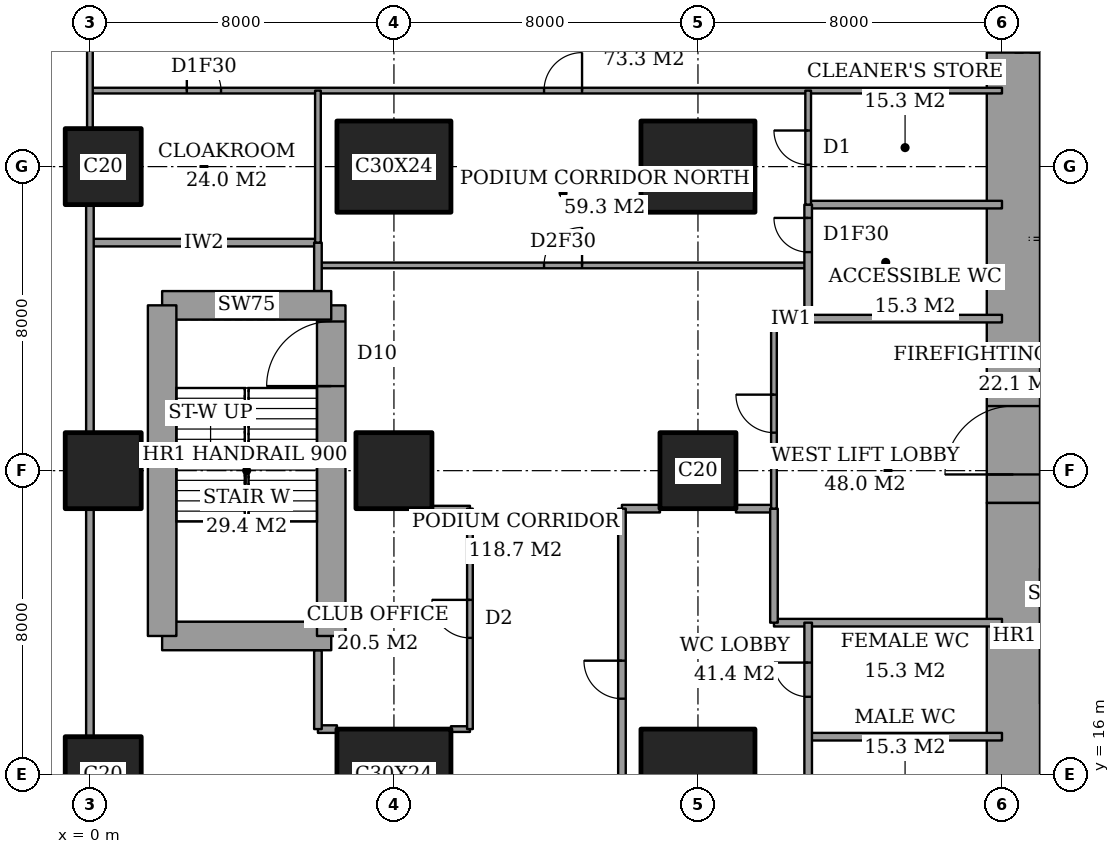
"""IFC4 building model, lengths in metres.
Left out: names, types, materials, properties, quantities, classifications, styles, units other than length and angle.
Written with IfcOpenShell. Run it as: python <this file> out.ifc"""

import sys

from ifc_helpers import new_model, si_unit, direction, frame, frame_2d, origin, origin_2d, place, context, subcontext, project, spatial, rectangle, extrude, element, fill, save


model = new_model("IFC4")
c1 = context("Model", 3, precision=1e-05, world=origin(), true_north=direction((0.0, 1.0)))
c2 = subcontext(c1, "Body", "Model", "MODEL_VIEW")
j1 = project(units=[si_unit("LENGTHUNIT", "METRE"), si_unit("PLANEANGLEUNIT", "RADIAN")], contexts=[c1])
p1 = place(None, origin())
s1 = spatial("IfcSite", under=j1, at=p1, CompositionType="ELEMENT")
p2 = place(p1, origin())
s2 = spatial("IfcBuilding", under=s1, at=p2, CompositionType="ELEMENT")
p3 = place(p2, frame((0.0, 0.0, 6.0)))
s3 = spatial("IfcBuildingStorey", under=s2, at=p3, CompositionType="ELEMENT", Elevation=6.0)
for number, where, z_axis, x_axis in (
    (1, (0.35, 16.0, 0.0), (0.0, 0.0, 1.0), (1.0, 0.0, 0.0)),
    (2, (0.35, 24.0, 0.0), (0.0, 0.0, 1.0), (1.0, 0.0, 0.0)),
    (3, (0.35, 32.0, 0.0), (0.0, 0.0, 1.0), (1.0, 0.0, 0.0)),
):
    element("IfcColumn", number, at=place(p3, frame(where, z_axis=z_axis, x_axis=x_axis)), inside=s3, PredefinedType="COLUMN", context=c2, shape_type="SweptSolid", body=[
        extrude(rectangle(XDim=2.0, YDim=2.0, at=origin_2d()), origin(), (0.0, 0.0, 1.0), 5.0),
    ])
p4 = place(p3, frame((8.0, 16.0, 0.0), z_axis=(0.0, 0.0, 1.0), x_axis=(1.0, 0.0, 0.0)))
e4 = element("IfcColumn", 4, at=p4, inside=s3, PredefinedType="COLUMN", context=c2, shape_type="SweptSolid", body=[
    extrude(rectangle(XDim=3.0, YDim=2.4, at=origin_2d()), origin(), (0.0, 0.0, 1.0), 5.0),
])
p5 = place(p3, frame((8.0, 24.0, 0.0), z_axis=(0.0, 0.0, 1.0), x_axis=(1.0, 0.0, 0.0)))
e5 = element("IfcColumn", 5, at=p5, inside=s3, PredefinedType="COLUMN", context=c2, shape_type="SweptSolid", body=[
    extrude(rectangle(XDim=2.0, YDim=2.0, at=origin_2d()), origin(), (0.0, 0.0, 1.0), 5.0),
])
for number, where, z_axis, x_axis in (
    (6, (8.0, 32.0, 0.0), (0.0, 0.0, 1.0), (1.0, 0.0, 0.0)),
    (7, (16.0, 16.0, 0.0), (0.0, 0.0, 1.0), (1.0, 0.0, 0.0)),
):
    element("IfcColumn", number, at=place(p3, frame(where, z_axis=z_axis, x_axis=x_axis)), inside=s3, PredefinedType="COLUMN", context=c2, shape_type="SweptSolid", body=[
        extrude(rectangle(XDim=3.0, YDim=2.4, at=origin_2d()), origin(), (0.0, 0.0, 1.0), 5.0),
    ])
p6 = place(p3, frame((16.0, 24.0, 0.0), z_axis=(0.0, 0.0, 1.0), x_axis=(1.0, 0.0, 0.0)))
e8 = element("IfcColumn", 8, at=p6, inside=s3, PredefinedType="COLUMN", context=c2, shape_type="SweptSolid", body=[
    extrude(rectangle(XDim=2.0, YDim=2.0, at=origin_2d()), origin(), (0.0, 0.0, 1.0), 5.0),
])
p7 = place(p3, frame((16.0, 32.0, 0.0), z_axis=(0.0, 0.0, 1.0), x_axis=(1.0, 0.0, 0.0)))
e9 = element("IfcColumn", 9, at=p7, inside=s3, PredefinedType="COLUMN", context=c2, shape_type="SweptSolid", body=[
    extrude(rectangle(XDim=3.0, YDim=2.4, at=origin_2d()), origin(), (0.0, 0.0, 1.0), 5.0),
])
p8 = place(p3, frame((24.3, 13.0, 0.0), z_axis=(0.0, 0.0, 1.0), x_axis=(0.0, 1.0, 0.0)))
e10 = element("IfcWall", 10, at=p8, inside=s3, PredefinedType="SHEAR", context=c2, shape_type="SweptSolid", body=[
    extrude(rectangle(XDim=10.15, YDim=1.4, at=frame_2d((5.075, 0.0))), origin(), (0.0, 0.0, 1.0), 5.0),
])
p9 = place(p3, frame((24.3, 23.15, 0.0), z_axis=(0.0, 0.0, 1.0), x_axis=(0.0, 1.0, 0.0)))
e11 = element("IfcWall", 11, at=p9, inside=s3, PredefinedType="SHEAR", context=c2, shape_type="SweptSolid", body=[
    extrude(rectangle(XDim=11.85, YDim=1.4, at=frame_2d((5.925, 0.0))), origin(), (0.0, 0.0, 1.0), 5.0),
])
p10 = place(p9, frame((0.75, 0.0, 0.0)))
e12 = element("IfcOpeningElement", 12, at=p10, cuts=e11, PredefinedType="OPENING", context=c2, shape_type="SweptSolid", body=[
    extrude(rectangle(XDim=1.8, YDim=2.4, at=frame_2d((0.9, 1.2))), frame((0.0, 0.71, 0.0), z_axis=(0.0, -1.0, 0.0), x_axis=(1.0, 0.0, 0.0)), (0.0, 0.0, 1.0), 1.42),
])
p11 = place(p3, frame((1.9, 19.65, 0.0), z_axis=(0.0, 0.0, 1.0), x_axis=(1.0, 0.0, 0.0)))
e13 = element("IfcWall", 13, at=p11, inside=s3, PredefinedType="SHEAR", context=c2, shape_type="SweptSolid", body=[
    extrude(rectangle(XDim=4.45, YDim=0.75, at=frame_2d((2.225, 0.0))), origin(), (0.0, 0.0, 1.0), 5.0),
])
p12 = place(p3, frame((6.35, 19.65, 0.0), z_axis=(0.0, 0.0, 1.0), x_axis=(0.0, 1.0, 0.0)))
e14 = element("IfcWall", 14, at=p12, inside=s3, PredefinedType="SHEAR", context=c2, shape_type="SweptSolid", body=[
    extrude(rectangle(XDim=8.7, YDim=0.75, at=frame_2d((4.35, 0.0))), origin(), (0.0, 0.0, 1.0), 5.0),
])
p13 = place(p12, frame((6.575, 0.0, 0.0)))
e15 = element("IfcOpeningElement", 15, at=p13, cuts=e14, PredefinedType="OPENING", context=c2, shape_type="SweptSolid", body=[
    extrude(rectangle(XDim=1.7, YDim=2.1, at=frame_2d((0.85, 1.05))), frame((0.0, 0.385, 0.0), z_axis=(0.0, -1.0, 0.0), x_axis=(1.0, 0.0, 0.0)), (0.0, 0.0, 1.0), 0.77),
])
p14 = place(p3, frame((6.35, 28.35, 0.0), z_axis=(0.0, 0.0, 1.0), x_axis=(-1.0, 0.0, 0.0)))
e16 = element("IfcWall", 16, at=p14, inside=s3, PredefinedType="SHEAR", context=c2, shape_type="SweptSolid", body=[
    extrude(rectangle(XDim=4.45, YDim=0.75, at=frame_2d((2.225, 0.0))), origin(), (0.0, 0.0, 1.0), 5.0),
])
p15 = place(p3, frame((1.9, 28.35, 0.0), z_axis=(0.0, 0.0, 1.0), x_axis=(0.0, -1.0, 0.0)))
e17 = element("IfcWall", 17, at=p15, inside=s3, PredefinedType="SHEAR", context=c2, shape_type="SweptSolid", body=[
    extrude(rectangle(XDim=8.7, YDim=0.75, at=frame_2d((4.35, 0.0))), origin(), (0.0, 0.0, 1.0), 5.0),
])
p16 = place(p3, frame((18.9, 17.0, 0.0), z_axis=(0.0, 0.0, 1.0), x_axis=(1.0, 0.0, 0.0)))
e18 = element("IfcWall", 18, at=p16, inside=s3, PredefinedType="PARTITIONING", context=c2, shape_type="SweptSolid", body=[
    extrude(rectangle(XDim=5.1, YDim=0.2, at=frame_2d((2.55, 0.0))), origin(), (0.0, 0.0, 1.0), 4.7),
])
p17 = place(p3, frame((6.0, 17.2, 0.0), z_axis=(0.0, 0.0, 1.0), x_axis=(1.0, 0.0, 0.0)))
e19 = element("IfcWall", 19, at=p17, inside=s3, PredefinedType="PARTITIONING", context=c2, shape_type="SweptSolid", body=[
    extrude(rectangle(XDim=0.5, YDim=0.2, at=frame_2d((0.25, 0.0))), origin(), (0.0, 0.0, 1.0), 4.7),
])
p18 = place(p3, frame((9.5, 17.2, 0.0), z_axis=(0.0, 0.0, 1.0), x_axis=(1.0, 0.0, 0.0)))
e20 = element("IfcWall", 20, at=p18, inside=s3, PredefinedType="PARTITIONING", context=c2, shape_type="SweptSolid", body=[
    extrude(rectangle(XDim=0.5, YDim=0.15, at=frame_2d((0.25, 0.0))), origin(), (0.0, 0.0, 1.0), 4.7),
])
p19 = place(p3, frame((18.0, 20.0, 0.0), z_axis=(0.0, 0.0, 1.0), x_axis=(1.0, 0.0, 0.0)))
e21 = element("IfcWall", 21, at=p19, inside=s3, PredefinedType="PARTITIONING", context=c2, shape_type="SweptSolid", body=[
    extrude(rectangle(XDim=6.0, YDim=0.2, at=frame_2d((3.0, 0.0))), origin(), (0.0, 0.0, 1.0), 4.7),
])
for number, where, z_axis, x_axis in (
    (22, (14.0, 23.0, 0.0), (0.0, 0.0, 1.0), (1.0, 0.0, 0.0)),
    (23, (17.0, 23.0, 0.0), (0.0, 0.0, 1.0), (1.0, 0.0, 0.0)),
):
    element("IfcWall", number, at=place(p3, frame(where, z_axis=z_axis, x_axis=x_axis)), inside=s3, PredefinedType="PARTITIONING", context=c2, shape_type="SweptSolid", body=[
        extrude(rectangle(XDim=1.0, YDim=0.2, at=frame_2d((0.5, 0.0))), origin(), (0.0, 0.0, 1.0), 4.7),
    ])
p20 = place(p3, frame((9.0, 23.0, 0.0), z_axis=(0.0, 0.0, 1.0), x_axis=(1.0, 0.0, 0.0)))
e24 = element("IfcWall", 24, at=p20, inside=s3, PredefinedType="PARTITIONING", context=c2, shape_type="SweptSolid", body=[
    extrude(rectangle(XDim=1.0, YDim=0.15, at=frame_2d((0.5, 0.0))), origin(), (0.0, 0.0, 1.0), 4.7),
])
p21 = place(p3, frame((18.9, 28.0, 0.0), z_axis=(0.0, 0.0, 1.0), x_axis=(1.0, 0.0, 0.0)))
e25 = element("IfcWall", 25, at=p21, inside=s3, PredefinedType="PARTITIONING", context=c2, shape_type="SweptSolid", body=[
    extrude(rectangle(XDim=5.1, YDim=0.2, at=frame_2d((2.55, 0.0))), origin(), (0.0, 0.0, 1.0), 4.7),
])
p22 = place(p3, frame((18.0, 28.0, 0.0), z_axis=(0.0, 0.0, 1.0), x_axis=(1.0, 0.0, 0.0)))
e26 = element("IfcWall", 26, at=p22, inside=s3, PredefinedType="PARTITIONING", context=c2, shape_type="SweptSolid", body=[
    extrude(rectangle(XDim=0.9, YDim=0.15, at=frame_2d((0.45, 0.0))), origin(), (0.0, 0.0, 1.0), 4.7),
])
p23 = place(p3, frame((6.0, 29.4, 0.0), z_axis=(0.0, 0.0, 1.0), x_axis=(1.0, 0.0, 0.0)))
e27 = element("IfcWall", 27, at=p23, inside=s3, PredefinedType="PARTITIONING", context=c2, shape_type="SweptSolid", body=[
    extrude(rectangle(XDim=12.9, YDim=0.15, at=frame_2d((6.45, 0.0))), origin(), (0.0, 0.0, 1.0), 4.7),
])
p24 = place(p23, frame((5.95, 0.0, 0.0)))
e28 = element("IfcOpeningElement", 28, at=p24, cuts=e27, PredefinedType="OPENING", context=c2, shape_type="SweptSolid", body=[
    extrude(rectangle(XDim=1.0, YDim=2.1, at=frame_2d((0.5, 1.05))), frame((0.0, 0.085, 0.0), z_axis=(0.0, -1.0, 0.0), x_axis=(1.0, 0.0, 0.0)), (0.0, 0.0, 1.0), 0.17),
])
p25 = place(p3, frame((0.0, 30.0, 0.0), z_axis=(0.0, 0.0, 1.0), x_axis=(1.0, 0.0, 0.0)))
e29 = element("IfcWall", 29, at=p25, inside=s3, PredefinedType="PARTITIONING", context=c2, shape_type="SweptSolid", body=[
    extrude(rectangle(XDim=6.0, YDim=0.2, at=frame_2d((3.0, 0.0))), origin(), (0.0, 0.0, 1.0), 4.7),
])
p26 = place(p3, frame((18.9, 31.0, 0.0), z_axis=(0.0, 0.0, 1.0), x_axis=(1.0, 0.0, 0.0)))
e30 = element("IfcWall", 30, at=p26, inside=s3, PredefinedType="PARTITIONING", context=c2, shape_type="SweptSolid", body=[
    extrude(rectangle(XDim=5.1, YDim=0.2, at=frame_2d((2.55, 0.0))), origin(), (0.0, 0.0, 1.0), 4.7),
])
p27 = place(p3, frame((0.0, 34.0, 0.0), z_axis=(0.0, 0.0, 1.0), x_axis=(1.0, 0.0, 0.0)))
e31 = element("IfcWall", 31, at=p27, inside=s3, PredefinedType="PARTITIONING", context=c2, shape_type="SweptSolid", body=[
    extrude(rectangle(XDim=24.0, YDim=0.15, at=frame_2d((12.0, 0.0))), origin(), (0.0, 0.0, 1.0), 4.7),
])
p28 = place(p27, frame((11.95, 0.0, 0.0)))
e32 = element("IfcOpeningElement", 32, at=p28, cuts=e31, PredefinedType="OPENING", context=c2, shape_type="SweptSolid", body=[
    extrude(rectangle(XDim=1.0, YDim=2.1, at=frame_2d((0.5, 1.05))), frame((0.0, 0.085, 0.0), z_axis=(0.0, -1.0, 0.0), x_axis=(1.0, 0.0, 0.0)), (0.0, 0.0, 1.0), 0.17),
])
p29 = place(p27, frame((2.55, 0.0, 0.0)))
e33 = element("IfcOpeningElement", 33, at=p29, cuts=e31, PredefinedType="OPENING", context=c2, shape_type="SweptSolid", body=[
    extrude(rectangle(XDim=0.9, YDim=2.1, at=frame_2d((0.45, 1.05))), frame((0.0, 0.085, 0.0), z_axis=(0.0, -1.0, 0.0), x_axis=(1.0, 0.0, 0.0)), (0.0, 0.0, 1.0), 0.17),
])
for number, where, z_axis, x_axis in (
    (34, (0.0, 17.0, 0.0), (0.0, 0.0, 1.0), (0.0, 1.0, 0.0)),
    (35, (0.0, 25.0, 0.0), (0.0, 0.0, 1.0), (0.0, 1.0, 0.0)),
):
    element("IfcWall", number, at=place(p3, frame(where, z_axis=z_axis, x_axis=x_axis)), inside=s3, PredefinedType="PARTITIONING", context=c2, shape_type="SweptSolid", body=[
        extrude(rectangle(XDim=6.0, YDim=0.2, at=frame_2d((3.0, 0.0))), origin(), (0.0, 0.0, 1.0), 3.3),
    ])
p30 = place(p3, frame((0.0, 33.0, 0.0), z_axis=(0.0, 0.0, 1.0), x_axis=(0.0, 1.0, 0.0)))
e36 = element("IfcWall", 36, at=p30, inside=s3, PredefinedType="PARTITIONING", context=c2, shape_type="SweptSolid", body=[
    extrude(rectangle(XDim=6.0, YDim=0.15, at=frame_2d((3.0, 0.0))), origin(), (0.0, 0.0, 1.0), 3.3),
])
p31 = place(p3, frame((6.0, 17.2, 0.0), z_axis=(0.0, 0.0, 1.0), x_axis=(0.0, 1.0, 0.0)))
e37 = element("IfcWall", 37, at=p31, inside=s3, PredefinedType="PARTITIONING", context=c2, shape_type="SweptSolid", body=[
    extrude(rectangle(XDim=2.075, YDim=0.2, at=frame_2d((1.038, 0.0))), origin(), (0.0, 0.0, 1.0), 4.7),
])
p32 = place(p3, frame((6.0, 28.725, 0.0), z_axis=(0.0, 0.0, 1.0), x_axis=(0.0, 1.0, 0.0)))
e38 = element("IfcWall", 38, at=p32, inside=s3, PredefinedType="PARTITIONING", context=c2, shape_type="SweptSolid", body=[
    extrude(rectangle(XDim=1.275, YDim=0.2, at=frame_2d((0.637, 0.0))), origin(), (0.0, 0.0, 1.0), 4.7),
])
p33 = place(p3, frame((6.0, 30.0, 0.0), z_axis=(0.0, 0.0, 1.0), x_axis=(0.0, 1.0, 0.0)))
e39 = element("IfcWall", 39, at=p33, inside=s3, PredefinedType="PARTITIONING", context=c2, shape_type="SweptSolid", body=[
    extrude(rectangle(XDim=4.0, YDim=0.15, at=frame_2d((2.0, 0.0))), origin(), (0.0, 0.0, 1.0), 4.7),
])
p34 = place(p3, frame((10.0, 17.2, 0.0), z_axis=(0.0, 0.0, 1.0), x_axis=(0.0, 1.0, 0.0)))
e40 = element("IfcWall", 40, at=p34, inside=s3, PredefinedType="PARTITIONING", context=c2, shape_type="SweptSolid", body=[
    extrude(rectangle(XDim=5.8, YDim=0.15, at=frame_2d((2.9, 0.0))), origin(), (0.0, 0.0, 1.0), 4.7),
])
p35 = place(p34, frame((2.4, 0.0, 0.0)))
e41 = element("IfcOpeningElement", 41, at=p35, cuts=e40, PredefinedType="OPENING", context=c2, shape_type="SweptSolid", body=[
    extrude(rectangle(XDim=1.0, YDim=2.1, at=frame_2d((0.5, 1.05))), frame((0.0, 0.085, 0.0), z_axis=(0.0, -1.0, 0.0), x_axis=(1.0, 0.0, 0.0)), (0.0, 0.0, 1.0), 0.17),
])
p36 = place(p3, frame((14.0, 14.0, 0.0), z_axis=(0.0, 0.0, 1.0), x_axis=(0.0, 1.0, 0.0)))
e42 = element("IfcWall", 42, at=p36, inside=s3, PredefinedType="PARTITIONING", context=c2, shape_type="SweptSolid", body=[
    extrude(rectangle(XDim=9.0, YDim=0.2, at=frame_2d((4.5, 0.0))), origin(), (0.0, 0.0, 1.0), 4.7),
])
p37 = place(p36, frame((4.0, 0.0, 0.0)))
e43 = element("IfcOpeningElement", 43, at=p37, cuts=e42, PredefinedType="OPENING", context=c2, shape_type="SweptSolid", body=[
    extrude(rectangle(XDim=1.0, YDim=2.1, at=frame_2d((0.5, 1.05))), frame((0.0, 0.11, 0.0), z_axis=(0.0, -1.0, 0.0), x_axis=(1.0, 0.0, 0.0)), (0.0, 0.0, 1.0), 0.22),
])
p38 = place(p3, frame((18.0, 20.0, 0.0), z_axis=(0.0, 0.0, 1.0), x_axis=(0.0, 1.0, 0.0)))
e44 = element("IfcWall", 44, at=p38, inside=s3, PredefinedType="PARTITIONING", context=c2, shape_type="SweptSolid", body=[
    extrude(rectangle(XDim=3.0, YDim=0.2, at=frame_2d((1.5, 0.0))), origin(), (0.0, 0.0, 1.0), 4.7),
])
p39 = place(p3, frame((18.0, 23.0, 0.0), z_axis=(0.0, 0.0, 1.0), x_axis=(0.0, 1.0, 0.0)))
e45 = element("IfcWall", 45, at=p39, inside=s3, PredefinedType="PARTITIONING", context=c2, shape_type="SweptSolid", body=[
    extrude(rectangle(XDim=5.0, YDim=0.15, at=frame_2d((2.5, 0.0))), origin(), (0.0, 0.0, 1.0), 4.7),
])
p40 = place(p39, frame((2.0, 0.0, 0.0)))
e46 = element("IfcOpeningElement", 46, at=p40, cuts=e45, PredefinedType="OPENING", context=c2, shape_type="SweptSolid", body=[
    extrude(rectangle(XDim=1.0, YDim=2.1, at=frame_2d((0.5, 1.05))), frame((0.0, 0.085, 0.0), z_axis=(0.0, -1.0, 0.0), x_axis=(1.0, 0.0, 0.0)), (0.0, 0.0, 1.0), 0.17),
])
p41 = place(p3, frame((18.9, 14.0, 0.0), z_axis=(0.0, 0.0, 1.0), x_axis=(0.0, 1.0, 0.0)))
e47 = element("IfcWall", 47, at=p41, inside=s3, PredefinedType="PARTITIONING", context=c2, shape_type="SweptSolid", body=[
    extrude(rectangle(XDim=6.0, YDim=0.2, at=frame_2d((3.0, 0.0))), origin(), (0.0, 0.0, 1.0), 4.7),
])
p42 = place(p41, frame((1.05, 0.0, 0.0)))
e48 = element("IfcOpeningElement", 48, at=p42, cuts=e47, PredefinedType="OPENING", context=c2, shape_type="SweptSolid", body=[
    extrude(rectangle(XDim=0.9, YDim=2.1, at=frame_2d((0.45, 1.05))), frame((0.0, 0.11, 0.0), z_axis=(0.0, -1.0, 0.0), x_axis=(1.0, 0.0, 0.0)), (0.0, 0.0, 1.0), 0.22),
])
p43 = place(p41, frame((4.05, 0.0, 0.0)))
e49 = element("IfcOpeningElement", 49, at=p43, cuts=e47, PredefinedType="OPENING", context=c2, shape_type="SweptSolid", body=[
    extrude(rectangle(XDim=0.9, YDim=2.1, at=frame_2d((0.45, 1.05))), frame((0.0, 0.11, 0.0), z_axis=(0.0, -1.0, 0.0), x_axis=(1.0, 0.0, 0.0)), (0.0, 0.0, 1.0), 0.22),
])
p44 = place(p3, frame((18.9, 28.0, 0.0), z_axis=(0.0, 0.0, 1.0), x_axis=(0.0, 1.0, 0.0)))
e50 = element("IfcWall", 50, at=p44, inside=s3, PredefinedType="PARTITIONING", context=c2, shape_type="SweptSolid", body=[
    extrude(rectangle(XDim=3.0, YDim=0.2, at=frame_2d((1.5, 0.0))), origin(), (0.0, 0.0, 1.0), 4.7),
])
p45 = place(p44, frame((1.75, 0.0, 0.0)))
e51 = element("IfcOpeningElement", 51, at=p45, cuts=e50, PredefinedType="OPENING", context=c2, shape_type="SweptSolid", body=[
    extrude(rectangle(XDim=0.9, YDim=2.1, at=frame_2d((0.45, 1.05))), frame((0.0, 0.11, 0.0), z_axis=(0.0, -1.0, 0.0), x_axis=(1.0, 0.0, 0.0)), (0.0, 0.0, 1.0), 0.22),
])
p46 = place(p3, frame((18.9, 31.0, 0.0), z_axis=(0.0, 0.0, 1.0), x_axis=(0.0, 1.0, 0.0)))
e52 = element("IfcWall", 52, at=p46, inside=s3, PredefinedType="PARTITIONING", context=c2, shape_type="SweptSolid", body=[
    extrude(rectangle(XDim=3.0, YDim=0.15, at=frame_2d((1.5, 0.0))), origin(), (0.0, 0.0, 1.0), 4.7),
])
p47 = place(p46, frame((1.05, 0.0, 0.0)))
e53 = element("IfcOpeningElement", 53, at=p47, cuts=e52, PredefinedType="OPENING", context=c2, shape_type="SweptSolid", body=[
    extrude(rectangle(XDim=0.9, YDim=2.1, at=frame_2d((0.45, 1.05))), frame((0.0, 0.085, 0.0), z_axis=(0.0, -1.0, 0.0), x_axis=(1.0, 0.0, 0.0)), (0.0, 0.0, 1.0), 0.17),
])
p48 = place(p28, origin())
e54 = element("IfcDoor", 54, at=p48, inside=s3, OperationType="SINGLE_SWING_LEFT", PredefinedType="DOOR", context=c2, shape_type="SweptSolid", body=[
    extrude(rectangle(XDim=1.0, YDim=2.1, at=frame_2d((0.5, 1.05))), frame((0.0, 0.025, 0.0), z_axis=(0.0, -1.0, 0.0), x_axis=(1.0, 0.0, 0.0)), (0.0, 0.0, 1.0), 0.05),
])
fill(e32, e54)
p49 = place(p29, origin())
e55 = element("IfcDoor", 55, at=p49, inside=s3, OperationType="SINGLE_SWING_RIGHT", PredefinedType="DOOR", context=c2, shape_type="SweptSolid", body=[
    extrude(rectangle(XDim=0.9, YDim=2.1, at=frame_2d((0.45, 1.05))), frame((0.0, 0.025, 0.0), z_axis=(0.0, -1.0, 0.0), x_axis=(1.0, 0.0, 0.0)), (0.0, 0.0, 1.0), 0.05),
])
fill(e33, e55)
p50 = place(p35, origin())
e56 = element("IfcDoor", 56, at=p50, inside=s3, OperationType="SINGLE_SWING_LEFT", PredefinedType="DOOR", context=c2, shape_type="SweptSolid", body=[
    extrude(rectangle(XDim=1.0, YDim=2.1, at=frame_2d((0.5, 1.05))), frame((0.0, 0.025, 0.0), z_axis=(0.0, -1.0, 0.0), x_axis=(1.0, 0.0, 0.0)), (0.0, 0.0, 1.0), 0.05),
])
fill(e41, e56)
p51 = place(p37, origin())
e57 = element("IfcDoor", 57, at=p51, inside=s3, OperationType="SINGLE_SWING_LEFT", PredefinedType="DOOR", context=c2, shape_type="SweptSolid", body=[
    extrude(rectangle(XDim=1.0, YDim=2.1, at=frame_2d((0.5, 1.05))), frame((0.0, 0.025, 0.0), z_axis=(0.0, -1.0, 0.0), x_axis=(1.0, 0.0, 0.0)), (0.0, 0.0, 1.0), 0.05),
])
fill(e43, e57)
p52 = place(p40, origin())
e58 = element("IfcDoor", 58, at=p52, inside=s3, OperationType="SINGLE_SWING_LEFT", PredefinedType="DOOR", context=c2, shape_type="SweptSolid", body=[
    extrude(rectangle(XDim=1.0, YDim=2.1, at=frame_2d((0.5, 1.05))), frame((0.0, 0.025, 0.0), z_axis=(0.0, -1.0, 0.0), x_axis=(1.0, 0.0, 0.0)), (0.0, 0.0, 1.0), 0.05),
])
fill(e46, e58)
p53 = place(p43, origin())
e59 = element("IfcDoor", 59, at=p53, inside=s3, OperationType="SINGLE_SWING_LEFT", PredefinedType="DOOR", context=c2, shape_type="SweptSolid", body=[
    extrude(rectangle(XDim=0.9, YDim=2.1, at=frame_2d((0.45, 1.05))), frame((0.0, 0.025, 0.0), z_axis=(0.0, -1.0, 0.0), x_axis=(1.0, 0.0, 0.0)), (0.0, 0.0, 1.0), 0.05),
])
fill(e49, e59)
p54 = place(p45, origin())
e60 = element("IfcDoor", 60, at=p54, inside=s3, OperationType="SINGLE_SWING_LEFT", PredefinedType="DOOR", context=c2, shape_type="SweptSolid", body=[
    extrude(rectangle(XDim=0.9, YDim=2.1, at=frame_2d((0.45, 1.05))), frame((0.0, 0.025, 0.0), z_axis=(0.0, -1.0, 0.0), x_axis=(1.0, 0.0, 0.0)), (0.0, 0.0, 1.0), 0.05),
])
fill(e51, e60)
p55 = place(p24, origin())
e61 = element("IfcDoor", 61, at=p55, inside=s3, OperationType="SINGLE_SWING_LEFT", PredefinedType="DOOR", context=c2, shape_type="SweptSolid", body=[
    extrude(rectangle(XDim=1.0, YDim=2.1, at=frame_2d((0.5, 1.05))), frame((0.0, 0.025, 0.0), z_axis=(0.0, -1.0, 0.0), x_axis=(1.0, 0.0, 0.0)), (0.0, 0.0, 1.0), 0.05),
])
fill(e28, e61)
p56 = place(p47, origin())
e62 = element("IfcDoor", 62, at=p56, inside=s3, OperationType="SINGLE_SWING_LEFT", PredefinedType="DOOR", context=c2, shape_type="SweptSolid", body=[
    extrude(rectangle(XDim=0.9, YDim=2.1, at=frame_2d((0.45, 1.05))), frame((0.0, 0.025, 0.0), z_axis=(0.0, -1.0, 0.0), x_axis=(1.0, 0.0, 0.0)), (0.0, 0.0, 1.0), 0.05),
])
fill(e53, e62)
p57 = place(p10, origin())
e63 = element("IfcDoor", 63, at=p57, inside=s3, OperationType="DOUBLE_DOOR_DOUBLE_SWING", PredefinedType="DOOR", context=c2, shape_type="SweptSolid", body=[
    extrude(rectangle(XDim=1.8, YDim=2.4, at=frame_2d((0.9, 1.2))), frame((0.0, 0.025, 0.0), z_axis=(0.0, -1.0, 0.0), x_axis=(1.0, 0.0, 0.0)), (0.0, 0.0, 1.0), 0.05),
])
fill(e12, e63)
p58 = place(p13, origin())
e64 = element("IfcDoor", 64, at=p58, inside=s3, OperationType="DOUBLE_DOOR_SINGLE_SWING", PredefinedType="DOOR", context=c2, shape_type="SweptSolid", body=[
    extrude(rectangle(XDim=1.7, YDim=2.1, at=frame_2d((0.85, 1.05))), frame((0.0, 0.025, 0.0), z_axis=(0.0, -1.0, 0.0), x_axis=(1.0, 0.0, 0.0)), (0.0, 0.0, 1.0), 0.05),
])
fill(e15, e64)
save(model, sys.argv[1])
